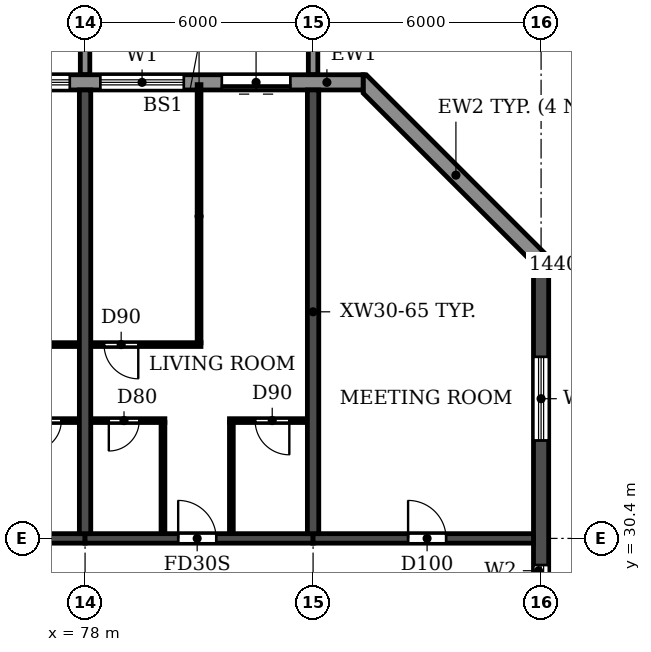
"""IFC4 building model, lengths in metres.
Left out: names, types, materials, properties, quantities, classifications, styles, units other than length and angle.
Written with IfcOpenShell. Run it as: python <this file> out.ifc"""

import sys

from ifc_helpers import new_model, si_unit, direction, frame, frame_2d, origin, place, context, subcontext, project, spatial, polyline, rectangle, outline, extrude, source, transform, mapped, element, fill, save


model = new_model("IFC4")
c1 = context("Model", 3, precision=1e-05, world=origin(), true_north=direction((0.0, 1.0)))
c2 = subcontext(c1, "Body", "Model", "MODEL_VIEW")
j1 = project(units=[si_unit("LENGTHUNIT", "METRE"), si_unit("PLANEANGLEUNIT", "RADIAN")], contexts=[c1])
p1 = place(None, origin())
s1 = spatial("IfcSite", under=j1, at=p1, CompositionType="ELEMENT")
p2 = place(p1, origin())
s2 = spatial("IfcBuilding", under=s1, at=p2, CompositionType="ELEMENT")
p3 = place(p2, frame((0.0, 0.0, 155.4)))
s3 = spatial("IfcBuildingStorey", under=s2, at=p3, CompositionType="ELEMENT", Elevation=155.4)
for number, where, z_axis, x_axis in (
    (1, (78.0, 30.525, 0.0), (0.0, 0.0, 1.0), (0.0, 1.0, 0.0)),
    (2, (84.0, 30.525, 0.0), (0.0, 0.0, 1.0), (0.0, 1.0, 0.0)),
):
    element("IfcWall", number, at=place(p3, frame(where, z_axis=z_axis, x_axis=x_axis)), inside=s3, PredefinedType="SHEAR", context=c2, shape_type="SweptSolid", body=[
        extrude(rectangle(XDim=11.675, YDim=0.3, at=frame_2d((5.837, 0.0))), origin(), (0.0, 0.0, 1.0), 3.0),
    ])
p4 = place(p3, frame((90.0, 4.683, 0.0), z_axis=(0.0, 0.0, 1.0), x_axis=(0.0, 1.0, 0.0)))
e3 = element("IfcWall", 3, at=p4, inside=s3, PredefinedType="SHEAR", context=c2, shape_type="SweptSolid", body=[
    extrude(rectangle(XDim=33.034, YDim=0.4, at=frame_2d((16.517, 0.0))), origin(), (0.0, 0.0, 1.0), 3.0),
])
p5 = place(p4, frame((23.817, 0.0, 0.9)))
e4 = element("IfcOpeningElement", 4, at=p5, cuts=e3, PredefinedType="OPENING", context=c2, shape_type="SweptSolid", body=[
    extrude(rectangle(XDim=1.2, YDim=1.5, at=frame_2d((0.6, 0.75))), frame((0.0, 0.21, 0.0), z_axis=(0.0, -1.0, 0.0), x_axis=(1.0, 0.0, 0.0)), (0.0, 0.0, 1.0), 0.42),
])
p6 = place(p4, frame((8.017, 0.0, 0.9)))
e5 = element("IfcOpeningElement", 5, at=p6, cuts=e3, PredefinedType="OPENING", context=c2, shape_type="SweptSolid", body=[
    extrude(rectangle(XDim=1.2, YDim=1.5, at=frame_2d((0.6, 0.75))), frame((0.0, 0.21, 0.0), z_axis=(0.0, -1.0, 0.0), x_axis=(1.0, 0.0, 0.0)), (0.0, 0.0, 1.0), 0.42),
])
p7 = place(p4, frame((28.293, 0.0, 0.6)))
e6 = element("IfcOpeningElement", 6, at=p7, cuts=e3, PredefinedType="OPENING", context=c2, shape_type="SweptSolid", body=[
    extrude(rectangle(XDim=2.2, YDim=1.8, at=frame_2d((1.1, 0.9))), frame((0.0, 0.21, 0.0), z_axis=(0.0, -1.0, 0.0), x_axis=(1.0, 0.0, 0.0)), (0.0, 0.0, 1.0), 0.42),
])
p8 = place(p4, frame((2.541, 0.0, 0.6)))
e7 = element("IfcOpeningElement", 7, at=p8, cuts=e3, PredefinedType="OPENING", context=c2, shape_type="SweptSolid", body=[
    extrude(rectangle(XDim=2.2, YDim=1.8, at=frame_2d((1.1, 0.9))), frame((0.0, 0.21, 0.0), z_axis=(0.0, -1.0, 0.0), x_axis=(1.0, 0.0, 0.0)), (0.0, 0.0, 1.0), 0.42),
])
p9 = place(p4, frame((19.417, 0.0, 0.6)))
e8 = element("IfcOpeningElement", 8, at=p9, cuts=e3, PredefinedType="OPENING", context=c2, shape_type="SweptSolid", body=[
    extrude(rectangle(XDim=2.2, YDim=1.8, at=frame_2d((1.1, 0.9))), frame((0.0, 0.21, 0.0), z_axis=(0.0, -1.0, 0.0), x_axis=(1.0, 0.0, 0.0)), (0.0, 0.0, 1.0), 0.42),
])
p10 = place(p3, frame((72.0, 30.4, 0.0), z_axis=(0.0, 0.0, 1.0), x_axis=(1.0, 0.0, 0.0)))
e9 = element("IfcWall", 9, at=p10, inside=s3, PredefinedType="SHEAR", context=c2, shape_type="SweptSolid", body=[
    extrude(rectangle(XDim=6.0, YDim=0.25, at=frame_2d((3.0, 0.0))), origin(), (0.0, 0.0, 1.0), 2.4),
])
p11 = place(p10, frame((2.55, 0.0, 0.0)))
e10 = element("IfcOpeningElement", 10, at=p11, cuts=e9, PredefinedType="OPENING", context=c2, shape_type="SweptSolid", body=[
    extrude(rectangle(XDim=1.0, YDim=2.1, at=frame_2d((0.5, 1.05))), frame((0.0, 0.135, 0.0), z_axis=(0.0, -1.0, 0.0), x_axis=(1.0, 0.0, 0.0)), (0.0, 0.0, 1.0), 0.27),
])
p12 = place(p3, frame((78.0, 30.4, 0.0), z_axis=(0.0, 0.0, 1.0), x_axis=(1.0, 0.0, 0.0)))
e11 = element("IfcWall", 11, at=p12, inside=s3, PredefinedType="SHEAR", context=c2, shape_type="SweptSolid", body=[
    extrude(rectangle(XDim=6.0, YDim=0.25, at=frame_2d((3.0, 0.0))), origin(), (0.0, 0.0, 1.0), 2.4),
])
p13 = place(p12, frame((2.45, 0.0, 0.0)))
e12 = element("IfcOpeningElement", 12, at=p13, cuts=e11, PredefinedType="OPENING", context=c2, shape_type="SweptSolid", body=[
    extrude(rectangle(XDim=1.0, YDim=2.1, at=frame_2d((0.5, 1.05))), frame((0.0, 0.135, 0.0), z_axis=(0.0, -1.0, 0.0), x_axis=(1.0, 0.0, 0.0)), (0.0, 0.0, 1.0), 0.27),
])
p14 = place(p3, frame((84.0, 30.4, 0.0), z_axis=(0.0, 0.0, 1.0), x_axis=(1.0, 0.0, 0.0)))
e13 = element("IfcWall", 13, at=p14, inside=s3, PredefinedType="SHEAR", context=c2, shape_type="SweptSolid", body=[
    extrude(rectangle(XDim=5.8, YDim=0.25, at=frame_2d((2.9, 0.0))), origin(), (0.0, 0.0, 1.0), 2.4),
])
p15 = place(p14, frame((2.5, 0.0, 0.0)))
e14 = element("IfcOpeningElement", 14, at=p15, cuts=e13, PredefinedType="OPENING", context=c2, shape_type="SweptSolid", body=[
    extrude(rectangle(XDim=1.0, YDim=2.1, at=frame_2d((0.5, 1.05))), frame((0.0, 0.135, 0.0), z_axis=(0.0, -1.0, 0.0), x_axis=(1.0, 0.0, 0.0)), (0.0, 0.0, 1.0), 0.27),
])
p16 = place(p3, origin())
e15 = element("IfcWall", 15, at=p16, inside=s3, PredefinedType="STANDARD", context=c2, shape_type="SweptSolid", body=[
    extrude(outline(polyline([(90.2, 37.717), (90.2, 37.8), (85.4, 42.6), (85.317, 42.6), (85.317, 42.117), (89.717, 37.717), (90.2, 37.717)])), origin(), (0.0, 0.0, 1.0), 3.0),
])
p17 = place(p3, frame((85.317, 42.4, 0.0), z_axis=(0.0, 0.0, 1.0), x_axis=(-1.0, 0.0, 0.0)))
e16 = element("IfcWall", 16, at=p17, inside=s3, PredefinedType="STANDARD", context=c2, shape_type="SweptSolid", body=[
    extrude(rectangle(XDim=68.634, YDim=0.4, at=frame_2d((34.317, 0.0))), origin(), (0.0, 0.0, 1.0), 3.0),
])
p18 = place(p17, frame((64.917, 0.0, 0.0)))
e17 = element("IfcOpeningElement", 17, at=p18, cuts=e16, PredefinedType="OPENING", context=c2, shape_type="SweptSolid", body=[
    extrude(rectangle(XDim=1.8, YDim=2.4, at=frame_2d((0.9, 1.2))), frame((0.0, 0.21, 0.0), z_axis=(0.0, -1.0, 0.0), x_axis=(1.0, 0.0, 0.0)), (0.0, 0.0, 1.0), 0.42),
])
p19 = place(p17, frame((61.717, 0.0, 0.9)))
e18 = element("IfcOpeningElement", 18, at=p19, cuts=e16, PredefinedType="OPENING", context=c2, shape_type="SweptSolid", body=[
    extrude(rectangle(XDim=2.2, YDim=1.5, at=frame_2d((1.1, 0.75))), frame((0.0, 0.21, 0.0), z_axis=(0.0, -1.0, 0.0), x_axis=(1.0, 0.0, 0.0)), (0.0, 0.0, 1.0), 0.42),
])
p20 = place(p17, frame((58.717, 0.0, 0.9)))
e19 = element("IfcOpeningElement", 19, at=p20, cuts=e16, PredefinedType="OPENING", context=c2, shape_type="SweptSolid", body=[
    extrude(rectangle(XDim=2.2, YDim=1.5, at=frame_2d((1.1, 0.75))), frame((0.0, 0.21, 0.0), z_axis=(0.0, -1.0, 0.0), x_axis=(1.0, 0.0, 0.0)), (0.0, 0.0, 1.0), 0.42),
])
p21 = place(p17, frame((55.917, 0.0, 0.0)))
e20 = element("IfcOpeningElement", 20, at=p21, cuts=e16, PredefinedType="OPENING", context=c2, shape_type="SweptSolid", body=[
    extrude(rectangle(XDim=1.8, YDim=2.4, at=frame_2d((0.9, 1.2))), frame((0.0, 0.21, 0.0), z_axis=(0.0, -1.0, 0.0), x_axis=(1.0, 0.0, 0.0)), (0.0, 0.0, 1.0), 0.42),
])
p22 = place(p17, frame((52.917, 0.0, 0.0)))
e21 = element("IfcOpeningElement", 21, at=p22, cuts=e16, PredefinedType="OPENING", context=c2, shape_type="SweptSolid", body=[
    extrude(rectangle(XDim=1.8, YDim=2.4, at=frame_2d((0.9, 1.2))), frame((0.0, 0.21, 0.0), z_axis=(0.0, -1.0, 0.0), x_axis=(1.0, 0.0, 0.0)), (0.0, 0.0, 1.0), 0.42),
])
p23 = place(p17, frame((49.717, 0.0, 0.9)))
e22 = element("IfcOpeningElement", 22, at=p23, cuts=e16, PredefinedType="OPENING", context=c2, shape_type="SweptSolid", body=[
    extrude(rectangle(XDim=2.2, YDim=1.5, at=frame_2d((1.1, 0.75))), frame((0.0, 0.21, 0.0), z_axis=(0.0, -1.0, 0.0), x_axis=(1.0, 0.0, 0.0)), (0.0, 0.0, 1.0), 0.42),
])
p24 = place(p17, frame((46.717, 0.0, 0.9)))
e23 = element("IfcOpeningElement", 23, at=p24, cuts=e16, PredefinedType="OPENING", context=c2, shape_type="SweptSolid", body=[
    extrude(rectangle(XDim=2.2, YDim=1.5, at=frame_2d((1.1, 0.75))), frame((0.0, 0.21, 0.0), z_axis=(0.0, -1.0, 0.0), x_axis=(1.0, 0.0, 0.0)), (0.0, 0.0, 1.0), 0.42),
])
p25 = place(p17, frame((43.717, 0.0, 0.9)))
e24 = element("IfcOpeningElement", 24, at=p25, cuts=e16, PredefinedType="OPENING", context=c2, shape_type="SweptSolid", body=[
    extrude(rectangle(XDim=2.2, YDim=1.5, at=frame_2d((1.1, 0.75))), frame((0.0, 0.21, 0.0), z_axis=(0.0, -1.0, 0.0), x_axis=(1.0, 0.0, 0.0)), (0.0, 0.0, 1.0), 0.42),
])
p26 = place(p17, frame((40.917, 0.0, 0.0)))
e25 = element("IfcOpeningElement", 25, at=p26, cuts=e16, PredefinedType="OPENING", context=c2, shape_type="SweptSolid", body=[
    extrude(rectangle(XDim=1.8, YDim=2.4, at=frame_2d((0.9, 1.2))), frame((0.0, 0.21, 0.0), z_axis=(0.0, -1.0, 0.0), x_axis=(1.0, 0.0, 0.0)), (0.0, 0.0, 1.0), 0.42),
])
p27 = place(p17, frame((37.717, 0.0, 0.9)))
e26 = element("IfcOpeningElement", 26, at=p27, cuts=e16, PredefinedType="OPENING", context=c2, shape_type="SweptSolid", body=[
    extrude(rectangle(XDim=2.2, YDim=1.5, at=frame_2d((1.1, 0.75))), frame((0.0, 0.21, 0.0), z_axis=(0.0, -1.0, 0.0), x_axis=(1.0, 0.0, 0.0)), (0.0, 0.0, 1.0), 0.42),
])
p28 = place(p17, frame((34.917, 0.0, 0.0)))
e27 = element("IfcOpeningElement", 27, at=p28, cuts=e16, PredefinedType="OPENING", context=c2, shape_type="SweptSolid", body=[
    extrude(rectangle(XDim=1.8, YDim=2.4, at=frame_2d((0.9, 1.2))), frame((0.0, 0.21, 0.0), z_axis=(0.0, -1.0, 0.0), x_axis=(1.0, 0.0, 0.0)), (0.0, 0.0, 1.0), 0.42),
])
p29 = place(p17, frame((31.717, 0.0, 0.9)))
e28 = element("IfcOpeningElement", 28, at=p29, cuts=e16, PredefinedType="OPENING", context=c2, shape_type="SweptSolid", body=[
    extrude(rectangle(XDim=2.2, YDim=1.5, at=frame_2d((1.1, 0.75))), frame((0.0, 0.21, 0.0), z_axis=(0.0, -1.0, 0.0), x_axis=(1.0, 0.0, 0.0)), (0.0, 0.0, 1.0), 0.42),
])
p30 = place(p17, frame((28.717, 0.0, 0.9)))
e29 = element("IfcOpeningElement", 29, at=p30, cuts=e16, PredefinedType="OPENING", context=c2, shape_type="SweptSolid", body=[
    extrude(rectangle(XDim=2.2, YDim=1.5, at=frame_2d((1.1, 0.75))), frame((0.0, 0.21, 0.0), z_axis=(0.0, -1.0, 0.0), x_axis=(1.0, 0.0, 0.0)), (0.0, 0.0, 1.0), 0.42),
])
p31 = place(p17, frame((25.717, 0.0, 0.9)))
e30 = element("IfcOpeningElement", 30, at=p31, cuts=e16, PredefinedType="OPENING", context=c2, shape_type="SweptSolid", body=[
    extrude(rectangle(XDim=2.2, YDim=1.5, at=frame_2d((1.1, 0.75))), frame((0.0, 0.21, 0.0), z_axis=(0.0, -1.0, 0.0), x_axis=(1.0, 0.0, 0.0)), (0.0, 0.0, 1.0), 0.42),
])
p32 = place(p17, frame((22.717, 0.0, 0.9)))
e31 = element("IfcOpeningElement", 31, at=p32, cuts=e16, PredefinedType="OPENING", context=c2, shape_type="SweptSolid", body=[
    extrude(rectangle(XDim=2.2, YDim=1.5, at=frame_2d((1.1, 0.75))), frame((0.0, 0.21, 0.0), z_axis=(0.0, -1.0, 0.0), x_axis=(1.0, 0.0, 0.0)), (0.0, 0.0, 1.0), 0.42),
])
p33 = place(p17, frame((19.917, 0.0, 0.0)))
e32 = element("IfcOpeningElement", 32, at=p33, cuts=e16, PredefinedType="OPENING", context=c2, shape_type="SweptSolid", body=[
    extrude(rectangle(XDim=1.8, YDim=2.4, at=frame_2d((0.9, 1.2))), frame((0.0, 0.21, 0.0), z_axis=(0.0, -1.0, 0.0), x_axis=(1.0, 0.0, 0.0)), (0.0, 0.0, 1.0), 0.42),
])
p34 = place(p17, frame((16.717, 0.0, 0.9)))
e33 = element("IfcOpeningElement", 33, at=p34, cuts=e16, PredefinedType="OPENING", context=c2, shape_type="SweptSolid", body=[
    extrude(rectangle(XDim=2.2, YDim=1.5, at=frame_2d((1.1, 0.75))), frame((0.0, 0.21, 0.0), z_axis=(0.0, -1.0, 0.0), x_axis=(1.0, 0.0, 0.0)), (0.0, 0.0, 1.0), 0.42),
])
p35 = place(p17, frame((13.717, 0.0, 0.9)))
e34 = element("IfcOpeningElement", 34, at=p35, cuts=e16, PredefinedType="OPENING", context=c2, shape_type="SweptSolid", body=[
    extrude(rectangle(XDim=2.2, YDim=1.5, at=frame_2d((1.1, 0.75))), frame((0.0, 0.21, 0.0), z_axis=(0.0, -1.0, 0.0), x_axis=(1.0, 0.0, 0.0)), (0.0, 0.0, 1.0), 0.42),
])
p36 = place(p17, frame((10.917, 0.0, 0.0)))
e35 = element("IfcOpeningElement", 35, at=p36, cuts=e16, PredefinedType="OPENING", context=c2, shape_type="SweptSolid", body=[
    extrude(rectangle(XDim=1.8, YDim=2.4, at=frame_2d((0.9, 1.2))), frame((0.0, 0.21, 0.0), z_axis=(0.0, -1.0, 0.0), x_axis=(1.0, 0.0, 0.0)), (0.0, 0.0, 1.0), 0.42),
])
p37 = place(p17, frame((7.717, 0.0, 0.9)))
e36 = element("IfcOpeningElement", 36, at=p37, cuts=e16, PredefinedType="OPENING", context=c2, shape_type="SweptSolid", body=[
    extrude(rectangle(XDim=2.2, YDim=1.5, at=frame_2d((1.1, 0.75))), frame((0.0, 0.21, 0.0), z_axis=(0.0, -1.0, 0.0), x_axis=(1.0, 0.0, 0.0)), (0.0, 0.0, 1.0), 0.42),
])
p38 = place(p17, frame((4.717, 0.0, 0.9)))
e37 = element("IfcOpeningElement", 37, at=p38, cuts=e16, PredefinedType="OPENING", context=c2, shape_type="SweptSolid", body=[
    extrude(rectangle(XDim=2.2, YDim=1.5, at=frame_2d((1.1, 0.75))), frame((0.0, 0.21, 0.0), z_axis=(0.0, -1.0, 0.0), x_axis=(1.0, 0.0, 0.0)), (0.0, 0.0, 1.0), 0.42),
])
p39 = place(p17, frame((1.917, 0.0, 0.0)))
e38 = element("IfcOpeningElement", 38, at=p39, cuts=e16, PredefinedType="OPENING", context=c2, shape_type="SweptSolid", body=[
    extrude(rectangle(XDim=1.8, YDim=2.4, at=frame_2d((0.9, 1.2))), frame((0.0, 0.21, 0.0), z_axis=(0.0, -1.0, 0.0), x_axis=(1.0, 0.0, 0.0)), (0.0, 0.0, 1.0), 0.42),
])
m1 = source(origin(), c2, "Body", "SweptSolid", [
    extrude(outline(polyline([(0.0, 0.0), (0.25, 0.0), (0.25, 3.1), (0.0, 3.1), (0.0, 0.0)])), origin(), (0.0, 0.0, 1.0), 3.1),
])
for number, where in (
    (39, (77.875, 42.6, 0.0)),
    (40, (83.875, 42.6, 0.0)),
):
    element("IfcWall", number, at=place(p3, frame(where)), inside=s3, PredefinedType="STANDARD", context=c2, shape_type="MappedRepresentation", body=[
        mapped(m1, transform((0.0, 0.0, 0.0))),
    ])
p40 = place(p3, frame((75.9, 33.5, 0.0), z_axis=(0.0, 0.0, 1.0), x_axis=(1.0, 0.0, 0.0)))
e41 = element("IfcWall", 41, at=p40, inside=s3, PredefinedType="PARTITIONING", context=c2, shape_type="SweptSolid", body=[
    extrude(rectangle(XDim=1.94, YDim=0.1, at=frame_2d((0.97, 0.0))), origin(), (0.0, 0.0, 1.0), 3.0),
])
p41 = place(p40, frame((0.675, 0.0, 0.0)))
e42 = element("IfcOpeningElement", 42, at=p41, cuts=e41, PredefinedType="OPENING", context=c2, shape_type="SweptSolid", body=[
    extrude(rectangle(XDim=0.8, YDim=2.1, at=frame_2d((0.4, 1.05))), frame((0.0, 0.06, 0.0), z_axis=(0.0, -1.0, 0.0), x_axis=(1.0, 0.0, 0.0)), (0.0, 0.0, 1.0), 0.12),
])
p42 = place(p3, frame((78.16, 33.5, 0.0), z_axis=(0.0, 0.0, 1.0), x_axis=(1.0, 0.0, 0.0)))
e43 = element("IfcWall", 43, at=p42, inside=s3, PredefinedType="PARTITIONING", context=c2, shape_type="SweptSolid", body=[
    extrude(rectangle(XDim=1.94, YDim=0.1, at=frame_2d((0.97, 0.0))), origin(), (0.0, 0.0, 1.0), 3.0),
])
p43 = place(p42, frame((0.465, 0.0, 0.0)))
e44 = element("IfcOpeningElement", 44, at=p43, cuts=e43, PredefinedType="OPENING", context=c2, shape_type="SweptSolid", body=[
    extrude(rectangle(XDim=0.8, YDim=2.1, at=frame_2d((0.4, 1.05))), frame((0.0, 0.06, 0.0), z_axis=(0.0, -1.0, 0.0), x_axis=(1.0, 0.0, 0.0)), (0.0, 0.0, 1.0), 0.12),
])
p44 = place(p3, frame((81.8, 33.5, 0.0), z_axis=(0.0, 0.0, 1.0), x_axis=(1.0, 0.0, 0.0)))
e45 = element("IfcWall", 45, at=p44, inside=s3, PredefinedType="PARTITIONING", context=c2, shape_type="SweptSolid", body=[
    extrude(rectangle(XDim=2.04, YDim=0.1, at=frame_2d((1.02, 0.0))), origin(), (0.0, 0.0, 1.0), 3.0),
])
p45 = place(p44, frame((0.675, 0.0, 0.0)))
e46 = element("IfcOpeningElement", 46, at=p45, cuts=e45, PredefinedType="OPENING", context=c2, shape_type="SweptSolid", body=[
    extrude(rectangle(XDim=0.9, YDim=2.1, at=frame_2d((0.45, 1.05))), frame((0.0, 0.06, 0.0), z_axis=(0.0, -1.0, 0.0), x_axis=(1.0, 0.0, 0.0)), (0.0, 0.0, 1.0), 0.12),
])
p46 = place(p3, frame((74.95, 35.5, 0.0), z_axis=(0.0, 0.0, 1.0), x_axis=(1.0, 0.0, 0.0)))
e47 = element("IfcWall", 47, at=p46, inside=s3, PredefinedType="PARTITIONING", context=c2, shape_type="SweptSolid", body=[
    extrude(rectangle(XDim=2.89, YDim=0.1, at=frame_2d((1.445, 0.0))), origin(), (0.0, 0.0, 1.0), 3.0),
])
p47 = place(p46, frame((0.55, 0.0, 0.0)))
e48 = element("IfcOpeningElement", 48, at=p47, cuts=e47, PredefinedType="OPENING", context=c2, shape_type="SweptSolid", body=[
    extrude(rectangle(XDim=0.9, YDim=2.1, at=frame_2d((0.45, 1.05))), frame((0.0, 0.06, 0.0), z_axis=(0.0, -1.0, 0.0), x_axis=(1.0, 0.0, 0.0)), (0.0, 0.0, 1.0), 0.12),
])
p48 = place(p3, frame((78.16, 35.5, 0.0), z_axis=(0.0, 0.0, 1.0), x_axis=(1.0, 0.0, 0.0)))
e49 = element("IfcWall", 49, at=p48, inside=s3, PredefinedType="PARTITIONING", context=c2, shape_type="SweptSolid", body=[
    extrude(rectangle(XDim=2.89, YDim=0.1, at=frame_2d((1.445, 0.0))), origin(), (0.0, 0.0, 1.0), 3.0),
])
p49 = place(p48, frame((0.34, 0.0, 0.0)))
e50 = element("IfcOpeningElement", 50, at=p49, cuts=e49, PredefinedType="OPENING", context=c2, shape_type="SweptSolid", body=[
    extrude(rectangle(XDim=0.9, YDim=2.1, at=frame_2d((0.45, 1.05))), frame((0.0, 0.06, 0.0), z_axis=(0.0, -1.0, 0.0), x_axis=(1.0, 0.0, 0.0)), (0.0, 0.0, 1.0), 0.12),
])
p50 = place(p3, frame((80.05, 30.535, 0.0), z_axis=(0.0, 0.0, 1.0), x_axis=(0.0, 1.0, 0.0)))
e51 = element("IfcWall", 51, at=p50, inside=s3, PredefinedType="PARTITIONING", context=c2, shape_type="SweptSolid", body=[
    extrude(rectangle(XDim=2.915, YDim=0.1, at=frame_2d((1.458, 0.0))), origin(), (0.0, 0.0, 1.0), 3.0),
])
p51 = place(p3, frame((81.0, 35.55, 0.0), z_axis=(0.0, 0.0, 1.0), x_axis=(0.0, 1.0, 0.0)))
e52 = element("IfcWall", 52, at=p51, inside=s3, PredefinedType="PARTITIONING", context=c2, shape_type="SweptSolid", body=[
    extrude(rectangle(XDim=6.79, YDim=0.1, at=frame_2d((3.395, 0.0))), origin(), (0.0, 0.0, 1.0), 3.0),
])
p52 = place(p3, frame((81.85, 30.535, 0.0), z_axis=(0.0, 0.0, 1.0), x_axis=(0.0, 1.0, 0.0)))
e53 = element("IfcWall", 53, at=p52, inside=s3, PredefinedType="PARTITIONING", context=c2, shape_type="SweptSolid", body=[
    extrude(rectangle(XDim=2.915, YDim=0.1, at=frame_2d((1.458, 0.0))), origin(), (0.0, 0.0, 1.0), 3.0),
])
p53 = place(p5, origin())
e54 = element("IfcWindow", 54, at=p53, inside=s3, PartitioningType="SINGLE_PANEL", PredefinedType="WINDOW", context=c2, shape_type="SweptSolid", body=[
    extrude(rectangle(XDim=1.2, YDim=1.5, at=frame_2d((0.6, 0.75))), frame((0.0, 0.03, 0.0), z_axis=(0.0, -1.0, 0.0), x_axis=(1.0, 0.0, 0.0)), (0.0, 0.0, 1.0), 0.06),
])
fill(e4, e54)
p54 = place(p7, origin())
e55 = element("IfcWindow", 55, at=p54, inside=s3, PartitioningType="DOUBLE_PANEL_HORIZONTAL", PredefinedType="WINDOW", context=c2, shape_type="SweptSolid", body=[
    extrude(rectangle(XDim=2.2, YDim=1.8, at=frame_2d((1.1, 0.9))), frame((0.0, 0.03, 0.0), z_axis=(0.0, -1.0, 0.0), x_axis=(1.0, 0.0, 0.0)), (0.0, 0.0, 1.0), 0.06),
])
fill(e6, e55)
p55 = place(p37, origin())
e56 = element("IfcWindow", 56, at=p55, inside=s3, PartitioningType="DOUBLE_PANEL_HORIZONTAL", PredefinedType="WINDOW", context=c2, shape_type="SweptSolid", body=[
    extrude(rectangle(XDim=2.2, YDim=1.5, at=frame_2d((1.1, 0.75))), frame((0.0, 0.03, 0.0), z_axis=(0.0, -1.0, 0.0), x_axis=(1.0, 0.0, 0.0)), (0.0, 0.0, 1.0), 0.06),
])
fill(e36, e56)
p56 = place(p38, origin())
e57 = element("IfcWindow", 57, at=p56, inside=s3, PartitioningType="DOUBLE_PANEL_HORIZONTAL", PredefinedType="WINDOW", context=c2, shape_type="SweptSolid", body=[
    extrude(rectangle(XDim=2.2, YDim=1.5, at=frame_2d((1.1, 0.75))), frame((0.0, 0.03, 0.0), z_axis=(0.0, -1.0, 0.0), x_axis=(1.0, 0.0, 0.0)), (0.0, 0.0, 1.0), 0.06),
])
fill(e37, e57)
p57 = place(p39, origin())
e58 = element("IfcDoor", 58, at=p57, inside=s3, OperationType="DOUBLE_DOOR_SLIDING", PredefinedType="DOOR", context=c2, shape_type="SweptSolid", body=[
    extrude(rectangle(XDim=1.8, YDim=2.4, at=frame_2d((0.9, 1.2))), frame((0.0, 0.025, 0.0), z_axis=(0.0, -1.0, 0.0), x_axis=(1.0, 0.0, 0.0)), (0.0, 0.0, 1.0), 0.05),
])
fill(e38, e58)
p58 = place(p41, frame((0.8, 0.0, 0.0), z_axis=(0.0, 0.0, 1.0), x_axis=(-1.0, 0.0, 0.0)))
e59 = element("IfcDoor", 59, at=p58, inside=s3, OperationType="SINGLE_SWING_RIGHT", PredefinedType="DOOR", context=c2, shape_type="SweptSolid", body=[
    extrude(rectangle(XDim=0.8, YDim=2.1, at=frame_2d((0.4, 1.05))), frame((0.0, 0.025, 0.0), z_axis=(0.0, -1.0, 0.0), x_axis=(1.0, 0.0, 0.0)), (0.0, 0.0, 1.0), 0.05),
])
fill(e42, e59)
p59 = place(p49, frame((0.9, 0.0, 0.0), z_axis=(0.0, 0.0, 1.0), x_axis=(-1.0, 0.0, 0.0)))
e60 = element("IfcDoor", 60, at=p59, inside=s3, OperationType="SINGLE_SWING_LEFT", PredefinedType="DOOR", context=c2, shape_type="SweptSolid", body=[
    extrude(rectangle(XDim=0.9, YDim=2.1, at=frame_2d((0.45, 1.05))), frame((0.0, 0.025, 0.0), z_axis=(0.0, -1.0, 0.0), x_axis=(1.0, 0.0, 0.0)), (0.0, 0.0, 1.0), 0.05),
])
fill(e50, e60)
p60 = place(p43, frame((0.8, 0.0, 0.0), z_axis=(0.0, 0.0, 1.0), x_axis=(-1.0, 0.0, 0.0)))
e61 = element("IfcDoor", 61, at=p60, inside=s3, OperationType="SINGLE_SWING_RIGHT", PredefinedType="DOOR", context=c2, shape_type="SweptSolid", body=[
    extrude(rectangle(XDim=0.8, YDim=2.1, at=frame_2d((0.4, 1.05))), frame((0.0, 0.025, 0.0), z_axis=(0.0, -1.0, 0.0), x_axis=(1.0, 0.0, 0.0)), (0.0, 0.0, 1.0), 0.05),
])
fill(e44, e61)
p61 = place(p13, origin())
e62 = element("IfcDoor", 62, at=p61, inside=s3, OperationType="SINGLE_SWING_LEFT", PredefinedType="DOOR", context=c2, shape_type="SweptSolid", body=[
    extrude(rectangle(XDim=1.0, YDim=2.1, at=frame_2d((0.5, 1.05))), frame((0.0, 0.025, 0.0), z_axis=(0.0, -1.0, 0.0), x_axis=(1.0, 0.0, 0.0)), (0.0, 0.0, 1.0), 0.05),
])
fill(e12, e62)
p62 = place(p45, frame((0.9, 0.0, 0.0), z_axis=(0.0, 0.0, 1.0), x_axis=(-1.0, 0.0, 0.0)))
e63 = element("IfcDoor", 63, at=p62, inside=s3, OperationType="SINGLE_SWING_LEFT", PredefinedType="DOOR", context=c2, shape_type="SweptSolid", body=[
    extrude(rectangle(XDim=0.9, YDim=2.1, at=frame_2d((0.45, 1.05))), frame((0.0, 0.025, 0.0), z_axis=(0.0, -1.0, 0.0), x_axis=(1.0, 0.0, 0.0)), (0.0, 0.0, 1.0), 0.05),
])
fill(e46, e63)
p63 = place(p15, origin())
e64 = element("IfcDoor", 64, at=p63, inside=s3, OperationType="SINGLE_SWING_LEFT", PredefinedType="DOOR", context=c2, shape_type="SweptSolid", body=[
    extrude(rectangle(XDim=1.0, YDim=2.1, at=frame_2d((0.5, 1.05))), frame((0.0, 0.025, 0.0), z_axis=(0.0, -1.0, 0.0), x_axis=(1.0, 0.0, 0.0)), (0.0, 0.0, 1.0), 0.05),
])
fill(e14, e64)
save(model, sys.argv[1])
